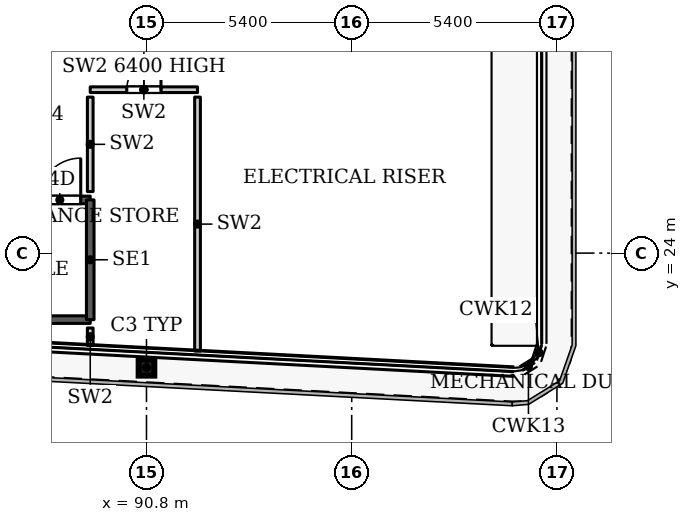
"""IFC4 building model, lengths in metres.
Left out: names, types, materials, properties, quantities, classifications, styles, units other than length and angle.
Written with IfcOpenShell. Run it as: python <this file> out.ifc"""

import sys

from ifc_helpers import new_model, si_unit, direction, frame, frame_2d, origin, origin_2d, place, context, subcontext, project, spatial, rectangle, i_section, extrude, source, transform, mapped, element, fill, save


model = new_model("IFC4")
c1 = context("Model", 3, precision=1e-05, world=origin(), true_north=direction((0.0, 1.0)))
c2 = subcontext(c1, "Body", "Model", "MODEL_VIEW")
j1 = project(units=[si_unit("LENGTHUNIT", "METRE"), si_unit("PLANEANGLEUNIT", "RADIAN")], contexts=[c1])
p1 = place(None, origin())
s1 = spatial("IfcSite", under=j1, at=p1, CompositionType="ELEMENT")
p2 = place(p1, origin())
s2 = spatial("IfcBuilding", under=s1, at=p2, CompositionType="ELEMENT")
p3 = place(p2, frame((0.0, 0.0, 144.8)))
s3 = spatial("IfcBuildingStorey", under=s2, at=p3, CompositionType="ELEMENT", Elevation=144.8)
p4 = place(p3, frame((90.8, 20.99, 0.0), z_axis=(0.0, 0.0, 1.0), x_axis=(1.0, 0.0, 0.0)))
e1 = element("IfcColumn", 1, at=p4, inside=s3, PredefinedType="COLUMN", context=c2, shape_type="SweptSolid", body=[
    extrude(i_section(OverallWidth=0.409, OverallDepth=0.425, WebThickness=0.033, FlangeThickness=0.052, FilletRadius=0.013, at=origin_2d()), origin(), (0.0, 0.0, 1.0), 7.8),
])
p5 = place(p3, frame((80.16, 22.25, 0.0), z_axis=(0.0, 0.0, 1.0), x_axis=(1.0, 0.0, 0.0)))
e2 = element("IfcWall", 2, at=p5, inside=s3, PredefinedType="SHEAR", context=c2, shape_type="SweptSolid", body=[
    extrude(rectangle(XDim=9.16, YDim=0.2, at=frame_2d((4.58, 0.0))), origin(), (0.0, 0.0, 1.0), 7.8),
])
p6 = place(p3, frame((80.16, 25.4, 0.0), z_axis=(0.0, 0.0, 1.0), x_axis=(1.0, 0.0, 0.0)))
e3 = element("IfcWall", 3, at=p6, inside=s3, PredefinedType="SHEAR", context=c2, shape_type="SweptSolid", body=[
    extrude(rectangle(XDim=9.16, YDim=0.2, at=frame_2d((4.58, 0.0))), origin(), (0.0, 0.0, 1.0), 7.8),
])
p7 = place(p6, frame((7.81, 0.0, 0.0)))
e4 = element("IfcOpeningElement", 4, at=p7, cuts=e3, PredefinedType="OPENING", context=c2, shape_type="SweptSolid", body=[
    extrude(rectangle(XDim=1.1, YDim=2.2, at=frame_2d((0.55, 1.1))), frame((0.0, 0.11, 0.0), z_axis=(0.0, -1.0, 0.0), x_axis=(1.0, 0.0, 0.0)), (0.0, 0.0, 1.0), 0.22),
])
p8 = place(p3, frame((89.32, 22.25, 0.0), z_axis=(0.0, 0.0, 1.0), x_axis=(0.0, 1.0, 0.0)))
e5 = element("IfcWall", 5, at=p8, inside=s3, PredefinedType="SHEAR", context=c2, shape_type="SweptSolid", body=[
    extrude(rectangle(XDim=3.15, YDim=0.2, at=frame_2d((1.575, 0.0))), origin(), (0.0, 0.0, 1.0), 7.8),
])
p9 = place(p3, frame((89.32, 28.3, 0.0), z_axis=(0.0, 0.0, 1.0), x_axis=(1.0, 0.0, 0.0)))
e6 = element("IfcWall", 6, at=p9, inside=s3, PredefinedType="PARTITIONING", context=c2, shape_type="SweptSolid", body=[
    extrude(rectangle(XDim=2.823, YDim=0.15, at=frame_2d((1.412, 0.0))), origin(), (0.0, 0.0, 1.0), 6.4),
])
p10 = place(p9, frame((0.962, 0.0, 0.0)))
e7 = element("IfcOpeningElement", 7, at=p10, cuts=e6, PredefinedType="OPENING", context=c2, shape_type="SweptSolid", body=[
    extrude(rectangle(XDim=0.9, YDim=2.2, at=frame_2d((0.45, 1.1))), frame((0.0, 0.085, 0.0), z_axis=(0.0, -1.0, 0.0), x_axis=(1.0, 0.0, 0.0)), (0.0, 0.0, 1.0), 0.17),
])
p11 = place(p3, frame((89.32, 21.571, 0.0), z_axis=(0.0, 0.0, 1.0), x_axis=(0.0, 1.0, 0.0)))
e8 = element("IfcWall", 8, at=p11, inside=s3, PredefinedType="PARTITIONING", context=c2, shape_type="SweptSolid", body=[
    extrude(rectangle(XDim=0.459, YDim=0.15, at=frame_2d((0.229, 0.0))), origin(), (0.0, 0.0, 1.0), 7.8),
])
p12 = place(p3, frame((89.32, 25.62, 0.0), z_axis=(0.0, 0.0, 1.0), x_axis=(0.0, 1.0, 0.0)))
e9 = element("IfcWall", 9, at=p12, inside=s3, PredefinedType="PARTITIONING", context=c2, shape_type="SweptSolid", body=[
    extrude(rectangle(XDim=2.485, YDim=0.15, at=frame_2d((1.242, 0.0))), origin(), (0.0, 0.0, 1.0), 7.8),
])
p13 = place(p3, frame((92.143, 21.422, 0.0), z_axis=(0.0, 0.0, 1.0), x_axis=(0.0, 1.0, 0.0)))
e10 = element("IfcWall", 10, at=p13, inside=s3, PredefinedType="PARTITIONING", context=c2, shape_type="SweptSolid", body=[
    extrude(rectangle(XDim=6.683, YDim=0.15, at=frame_2d((3.341, 0.0))), origin(), (0.0, 0.0, 1.0), 7.8),
])
m1 = source(origin(), c2, "Body", "SweptSolid", [
    extrude(rectangle(XDim=0.9, YDim=2.2, at=frame_2d((0.45, 1.1))), frame((0.0, 0.025, 0.0), z_axis=(0.0, -1.0, 0.0), x_axis=(1.0, 0.0, 0.0)), (0.0, 0.0, 1.0), 0.05),
])
p14 = place(p10, origin())
e11 = element("IfcDoor", 11, at=p14, inside=s3, OperationType="SINGLE_SWING_LEFT", PredefinedType="DOOR", context=c2, shape_type="MappedRepresentation", body=[
    mapped(m1, transform((0.0, 0.0, 0.0), x_axis=(1.0, 0.0, 0.0), y_axis=(0.0, 1.0, 0.0), z_axis=(0.0, 0.0, 1.0), scale=1.0)),
])
fill(e7, e11)
m2 = source(origin(), c2, "Body", "SweptSolid", [
    extrude(rectangle(XDim=1.1, YDim=2.2, at=frame_2d((0.55, 1.1))), frame((0.0, 0.025, 0.0), z_axis=(0.0, -1.0, 0.0), x_axis=(1.0, 0.0, 0.0)), (0.0, 0.0, 1.0), 0.05),
])
p15 = place(p7, origin())
e12 = element("IfcDoor", 12, at=p15, inside=s3, OperationType="SINGLE_SWING_LEFT", PredefinedType="DOOR", context=c2, shape_type="MappedRepresentation", body=[
    mapped(m2, transform((0.0, 0.0, 0.0), x_axis=(1.0, 0.0, 0.0), y_axis=(0.0, 1.0, 0.0), z_axis=(0.0, 0.0, 1.0), scale=1.0)),
])
fill(e4, e12)
save(model, sys.argv[1])
